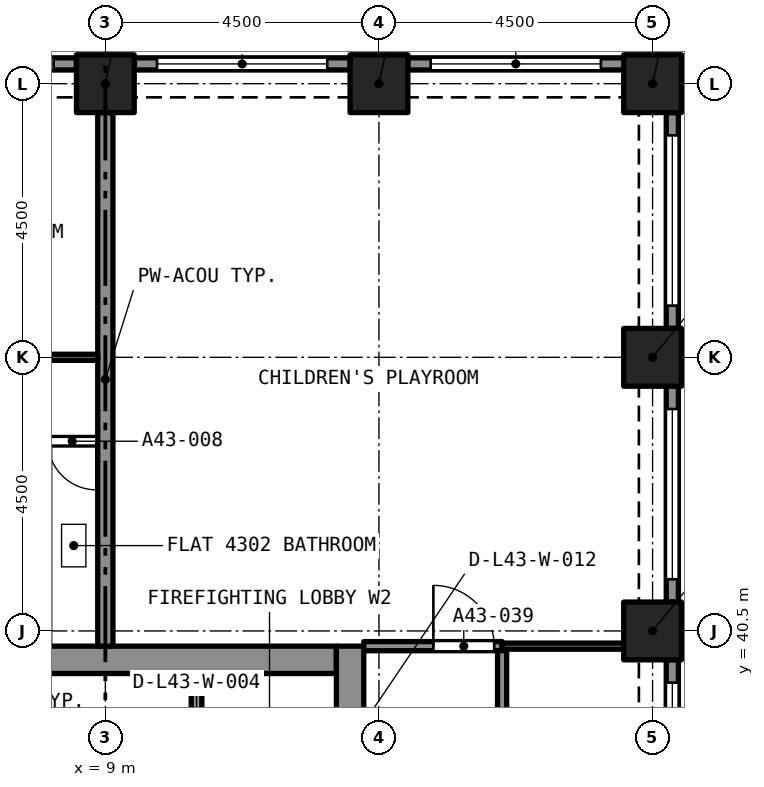
"""IFC4 building model, lengths in metres.
Left out: names, types, materials, properties, quantities, classifications, styles, units other than length and angle.
Written with IfcOpenShell. Run it as: python <this file> out.ifc"""

import sys

from ifc_helpers import new_model, si_unit, direction, frame, frame_2d, origin, origin_2d, place, context, subcontext, project, spatial, rectangle, extrude, element, fill, save


model = new_model("IFC4")
c1 = context("Model", 3, precision=1e-05, world=origin(), true_north=direction((0.0, 1.0)))
c2 = subcontext(c1, "Body", "Model", "MODEL_VIEW")
j1 = project(units=[si_unit("LENGTHUNIT", "METRE"), si_unit("PLANEANGLEUNIT", "RADIAN")], contexts=[c1])
p1 = place(None, origin())
s1 = spatial("IfcSite", under=j1, at=p1, CompositionType="ELEMENT")
p2 = place(p1, origin())
s2 = spatial("IfcBuilding", under=s1, at=p2, CompositionType="ELEMENT")
p3 = place(p2, frame((0.0, 0.0, 155.0)))
s3 = spatial("IfcBuildingStorey", under=s2, at=p3, CompositionType="ELEMENT", Elevation=155.0)
for number, where, z_axis, x_axis in (
    (1, (18.0, 40.5, 0.0), (0.0, 0.0, 1.0), (1.0, 0.0, 0.0)),
    (2, (18.0, 45.0, 0.0), (0.0, 0.0, 1.0), (1.0, 0.0, 0.0)),
    (3, (9.0, 49.5, 0.0), (0.0, 0.0, 1.0), (1.0, 0.0, 0.0)),
    (4, (13.5, 49.5, 0.0), (0.0, 0.0, 1.0), (1.0, 0.0, 0.0)),
    (5, (18.0, 49.5, 0.0), (0.0, 0.0, 1.0), (1.0, 0.0, 0.0)),
):
    element("IfcColumn", number, at=place(p3, frame(where, z_axis=z_axis, x_axis=x_axis)), inside=s3, PredefinedType="COLUMN", context=c2, shape_type="SweptSolid", body=[
        extrude(rectangle(XDim=0.95, YDim=0.95, at=origin_2d()), origin(), (0.0, 0.0, 1.0), 4.4),
    ])
p4 = place(p3, frame((5.2, 40.025, 0.0), z_axis=(0.0, 0.0, 1.0), x_axis=(1.0, 0.0, 0.0)))
e6 = element("IfcWall", 6, at=p4, inside=s3, PredefinedType="SOLIDWALL", context=c2, shape_type="SweptSolid", body=[
    extrude(rectangle(XDim=7.6, YDim=0.45, at=frame_2d((3.8, 0.0))), origin(), (0.0, 0.0, 1.0), 4.4),
])
p5 = place(p3, frame((13.025, 27.25, 0.0), z_axis=(0.0, 0.0, 1.0), x_axis=(0.0, 1.0, 0.0)))
e7 = element("IfcWall", 7, at=p5, inside=s3, PredefinedType="SOLIDWALL", context=c2, shape_type="SweptSolid", body=[
    extrude(rectangle(XDim=13.0, YDim=0.45, at=frame_2d((6.5, 0.0))), origin(), (0.0, 0.0, 1.0), 4.4),
])
p6 = place(p5, frame((10.85, 0.0, 0.0)))
e8 = element("IfcOpeningElement", 8, at=p6, cuts=e7, PredefinedType="OPENING", context=c2, shape_type="SweptSolid", body=[
    extrude(rectangle(XDim=1.1, YDim=2.1, at=frame_2d((0.55, 1.05))), frame((0.0, 0.235, 0.0), z_axis=(0.0, -1.0, 0.0), x_axis=(1.0, 0.0, 0.0)), (0.0, 0.0, 1.0), 0.47),
])
p7 = place(p5, frame((8.7, 0.0, 0.0)))
e9 = element("IfcOpeningElement", 9, at=p7, cuts=e7, PredefinedType="OPENING", context=c2, shape_type="SweptSolid", body=[
    extrude(rectangle(XDim=1.2, YDim=2.1, at=frame_2d((0.6, 1.05))), frame((0.0, 0.235, 0.0), z_axis=(0.0, -1.0, 0.0), x_axis=(1.0, 0.0, 0.0)), (0.0, 0.0, 1.0), 0.47),
])
p8 = place(p3, frame((13.975, 49.825, 0.0), z_axis=(0.0, 0.0, 1.0), x_axis=(1.0, 0.0, 0.0)))
e10 = element("IfcWall", 10, at=p8, inside=s3, PredefinedType="SOLIDWALL", context=c2, shape_type="SweptSolid", body=[
    extrude(rectangle(XDim=3.55, YDim=0.2, at=frame_2d((1.775, 0.0))), origin(), (0.0, 0.0, 1.0), 4.4),
])
p9 = place(p8, frame((0.375, 0.0, 0.45)))
e11 = element("IfcOpeningElement", 11, at=p9, cuts=e10, PredefinedType="OPENING", context=c2, shape_type="SweptSolid", body=[
    extrude(rectangle(XDim=2.8, YDim=2.55, at=frame_2d((1.4, 1.275))), frame((0.0, 0.11, 0.0), z_axis=(0.0, -1.0, 0.0), x_axis=(1.0, 0.0, 0.0)), (0.0, 0.0, 1.0), 0.22),
])
p10 = place(p3, frame((9.475, 49.825, 0.0), z_axis=(0.0, 0.0, 1.0), x_axis=(1.0, 0.0, 0.0)))
e12 = element("IfcWall", 12, at=p10, inside=s3, PredefinedType="SOLIDWALL", context=c2, shape_type="SweptSolid", body=[
    extrude(rectangle(XDim=3.55, YDim=0.2, at=frame_2d((1.775, 0.0))), origin(), (0.0, 0.0, 1.0), 4.4),
])
p11 = place(p10, frame((0.375, 0.0, 0.45)))
e13 = element("IfcOpeningElement", 13, at=p11, cuts=e12, PredefinedType="OPENING", context=c2, shape_type="SweptSolid", body=[
    extrude(rectangle(XDim=2.8, YDim=2.55, at=frame_2d((1.4, 1.275))), frame((0.0, 0.11, 0.0), z_axis=(0.0, -1.0, 0.0), x_axis=(1.0, 0.0, 0.0)), (0.0, 0.0, 1.0), 0.22),
])
p12 = place(p3, frame((4.975, 49.825, 0.0), z_axis=(0.0, 0.0, 1.0), x_axis=(1.0, 0.0, 0.0)))
e14 = element("IfcWall", 14, at=p12, inside=s3, PredefinedType="SOLIDWALL", context=c2, shape_type="SweptSolid", body=[
    extrude(rectangle(XDim=3.55, YDim=0.2, at=frame_2d((1.775, 0.0))), origin(), (0.0, 0.0, 1.0), 4.4),
])
p13 = place(p12, frame((0.375, 0.0, 0.45)))
e15 = element("IfcOpeningElement", 15, at=p13, cuts=e14, PredefinedType="OPENING", context=c2, shape_type="SweptSolid", body=[
    extrude(rectangle(XDim=2.8, YDim=2.55, at=frame_2d((1.4, 1.275))), frame((0.0, 0.11, 0.0), z_axis=(0.0, -1.0, 0.0), x_axis=(1.0, 0.0, 0.0)), (0.0, 0.0, 1.0), 0.22),
])
p14 = place(p3, frame((18.325, 40.025, 0.0), z_axis=(0.0, 0.0, 1.0), x_axis=(0.0, -1.0, 0.0)))
e16 = element("IfcWall", 16, at=p14, inside=s3, PredefinedType="SOLIDWALL", context=c2, shape_type="SweptSolid", body=[
    extrude(rectangle(XDim=3.55, YDim=0.2, at=frame_2d((1.775, 0.0))), origin(), (0.0, 0.0, 1.0), 4.4),
])
p15 = place(p14, frame((0.375, 0.0, 0.45)))
e17 = element("IfcOpeningElement", 17, at=p15, cuts=e16, PredefinedType="OPENING", context=c2, shape_type="SweptSolid", body=[
    extrude(rectangle(XDim=2.8, YDim=2.55, at=frame_2d((1.4, 1.275))), frame((0.0, 0.11, 0.0), z_axis=(0.0, -1.0, 0.0), x_axis=(1.0, 0.0, 0.0)), (0.0, 0.0, 1.0), 0.22),
])
p16 = place(p3, frame((18.325, 44.525, 0.0), z_axis=(0.0, 0.0, 1.0), x_axis=(0.0, -1.0, 0.0)))
e18 = element("IfcWall", 18, at=p16, inside=s3, PredefinedType="SOLIDWALL", context=c2, shape_type="SweptSolid", body=[
    extrude(rectangle(XDim=3.55, YDim=0.2, at=frame_2d((1.775, 0.0))), origin(), (0.0, 0.0, 1.0), 4.4),
])
p17 = place(p16, frame((0.375, 0.0, 0.45)))
e19 = element("IfcOpeningElement", 19, at=p17, cuts=e18, PredefinedType="OPENING", context=c2, shape_type="SweptSolid", body=[
    extrude(rectangle(XDim=2.8, YDim=2.55, at=frame_2d((1.4, 1.275))), frame((0.0, 0.11, 0.0), z_axis=(0.0, -1.0, 0.0), x_axis=(1.0, 0.0, 0.0)), (0.0, 0.0, 1.0), 0.22),
])
p18 = place(p3, frame((18.325, 49.025, 0.0), z_axis=(0.0, 0.0, 1.0), x_axis=(0.0, -1.0, 0.0)))
e20 = element("IfcWall", 20, at=p18, inside=s3, PredefinedType="SOLIDWALL", context=c2, shape_type="SweptSolid", body=[
    extrude(rectangle(XDim=3.55, YDim=0.2, at=frame_2d((1.775, 0.0))), origin(), (0.0, 0.0, 1.0), 4.4),
])
p19 = place(p18, frame((0.375, 0.0, 0.45)))
e21 = element("IfcOpeningElement", 21, at=p19, cuts=e20, PredefinedType="OPENING", context=c2, shape_type="SweptSolid", body=[
    extrude(rectangle(XDim=2.8, YDim=2.55, at=frame_2d((1.4, 1.275))), frame((0.0, 0.11, 0.0), z_axis=(0.0, -1.0, 0.0), x_axis=(1.0, 0.0, 0.0)), (0.0, 0.0, 1.0), 0.22),
])
p20 = place(p3, frame((8.875, 43.62, 0.0), z_axis=(0.0, 0.0, 1.0), x_axis=(-1.0, 0.0, 0.0)))
e22 = element("IfcWall", 22, at=p20, inside=s3, PredefinedType="PARTITIONING", context=c2, shape_type="SweptSolid", body=[
    extrude(rectangle(XDim=0.852, YDim=0.125, at=frame_2d((0.426, 0.0))), origin(), (0.0, 0.0, 1.0), 4.1),
])
p21 = place(p20, frame((0.02, 0.0, 0.0)))
e23 = element("IfcOpeningElement", 23, at=p21, cuts=e22, PredefinedType="OPENING", context=c2, shape_type="SweptSolid", body=[
    extrude(rectangle(XDim=0.8, YDim=2.1, at=frame_2d((0.4, 1.05))), frame((0.0, 0.073, 0.0), z_axis=(0.0, -1.0, 0.0), x_axis=(1.0, 0.0, 0.0)), (0.0, 0.0, 1.0), 0.145),
])
p22 = place(p3, frame((9.0, 40.25, 0.0), z_axis=(0.0, 0.0, 1.0), x_axis=(0.0, 1.0, 0.0)))
e24 = element("IfcWall", 24, at=p22, inside=s3, PredefinedType="PARTITIONING", context=c2, shape_type="SweptSolid", body=[
    extrude(rectangle(XDim=8.775, YDim=0.25, at=frame_2d((4.387, 0.0))), origin(), (0.0, 0.0, 1.0), 4.1),
])
p23 = place(p3, frame((4.5, 45.0, 0.0), z_axis=(0.0, 0.0, 1.0), x_axis=(1.0, 0.0, 0.0)))
e25 = element("IfcWall", 25, at=p23, inside=s3, PredefinedType="PARTITIONING", context=c2, shape_type="SweptSolid", body=[
    extrude(rectangle(XDim=4.375, YDim=0.1, at=frame_2d((2.188, 0.0))), origin(), (0.0, 0.0, 1.0), 4.1),
])
p24 = place(p23, frame((1.8, 0.0, 0.0)))
e26 = element("IfcOpeningElement", 26, at=p24, cuts=e25, PredefinedType="OPENING", context=c2, shape_type="SweptSolid", body=[
    extrude(rectangle(XDim=0.9, YDim=2.1, at=frame_2d((0.45, 1.05))), frame((0.0, 0.06, 0.0), z_axis=(0.0, -1.0, 0.0), x_axis=(1.0, 0.0, 0.0)), (0.0, 0.0, 1.0), 0.12),
])
p25 = place(p3, frame((13.25, 40.25, 0.0), z_axis=(0.0, 0.0, 1.0), x_axis=(1.0, 0.0, 0.0)))
e27 = element("IfcWall", 27, at=p25, inside=s3, PredefinedType="PARTITIONING", context=c2, shape_type="SweptSolid", body=[
    extrude(rectangle(XDim=2.275, YDim=0.15, at=frame_2d((1.137, 0.0))), origin(), (0.0, 0.0, 1.0), 4.1),
])
p26 = place(p25, frame((1.145, 0.0, 0.0)))
e28 = element("IfcOpeningElement", 28, at=p26, cuts=e27, PredefinedType="OPENING", context=c2, shape_type="SweptSolid", body=[
    extrude(rectangle(XDim=1.0, YDim=2.1, at=frame_2d((0.5, 1.05))), frame((0.0, 0.085, 0.0), z_axis=(0.0, -1.0, 0.0), x_axis=(1.0, 0.0, 0.0)), (0.0, 0.0, 1.0), 0.17),
])
p27 = place(p3, frame((15.525, 40.25, 0.0), z_axis=(0.0, 0.0, 1.0), x_axis=(1.0, 0.0, 0.0)))
e29 = element("IfcWall", 29, at=p27, inside=s3, PredefinedType="PARTITIONING", context=c2, shape_type="SweptSolid", body=[
    extrude(rectangle(XDim=2.0, YDim=0.1, at=frame_2d((1.0, 0.0))), origin(), (0.0, 0.0, 1.0), 4.1),
])
p28 = place(p3, frame((15.525, 40.175, 0.0), z_axis=(0.0, 0.0, 1.0), x_axis=(0.0, -1.0, 0.0)))
e30 = element("IfcWall", 30, at=p28, inside=s3, PredefinedType="PARTITIONING", context=c2, shape_type="SweptSolid", body=[
    extrude(rectangle(XDim=13.0, YDim=0.15, at=frame_2d((6.5, 0.0))), origin(), (0.0, 0.0, 1.0), 4.1),
])
p29 = place(p28, frame((5.925, 0.0, 0.0)))
e31 = element("IfcOpeningElement", 31, at=p29, cuts=e30, PredefinedType="OPENING", context=c2, shape_type="SweptSolid", body=[
    extrude(rectangle(XDim=1.0, YDim=2.1, at=frame_2d((0.5, 1.05))), frame((0.0, 0.085, 0.0), z_axis=(0.0, -1.0, 0.0), x_axis=(1.0, 0.0, 0.0)), (0.0, 0.0, 1.0), 0.17),
])
p30 = place(p3, frame((10.5, 37.5, 0.0), z_axis=(0.0, 0.0, 1.0), x_axis=(0.0, 1.0, 0.0)))
e32 = element("IfcWall", 32, at=p30, inside=s3, PredefinedType="SOLIDWALL", context=c2, shape_type="SweptSolid", body=[
    extrude(rectangle(XDim=2.3, YDim=0.175, at=frame_2d((1.15, 0.0))), origin(), (0.0, 0.0, 1.0), 4.1),
])
p31 = place(p30, frame((0.65, 0.0, 0.0)))
e33 = element("IfcOpeningElement", 33, at=p31, cuts=e32, PredefinedType="OPENING", context=c2, shape_type="SweptSolid", body=[
    extrude(rectangle(XDim=1.0, YDim=2.1, at=frame_2d((0.5, 1.05))), frame((0.0, 0.097, 0.0), z_axis=(0.0, -1.0, 0.0), x_axis=(1.0, 0.0, 0.0)), (0.0, 0.0, 1.0), 0.195),
])
p32 = place(p9, origin())
e34 = element("IfcWindow", 34, at=p32, inside=s3, PartitioningType="SINGLE_PANEL", PredefinedType="WINDOW", context=c2, shape_type="SweptSolid", body=[
    extrude(rectangle(XDim=2.8, YDim=2.55, at=frame_2d((1.4, 1.275))), frame((0.0, 0.03, 0.0), z_axis=(0.0, -1.0, 0.0), x_axis=(1.0, 0.0, 0.0)), (0.0, 0.0, 1.0), 0.06),
])
fill(e11, e34)
p33 = place(p11, origin())
e35 = element("IfcWindow", 35, at=p33, inside=s3, PartitioningType="SINGLE_PANEL", PredefinedType="WINDOW", context=c2, shape_type="SweptSolid", body=[
    extrude(rectangle(XDim=2.8, YDim=2.55, at=frame_2d((1.4, 1.275))), frame((0.0, 0.03, 0.0), z_axis=(0.0, -1.0, 0.0), x_axis=(1.0, 0.0, 0.0)), (0.0, 0.0, 1.0), 0.06),
])
fill(e13, e35)
p34 = place(p13, origin())
e36 = element("IfcWindow", 36, at=p34, inside=s3, PartitioningType="SINGLE_PANEL", PredefinedType="WINDOW", context=c2, shape_type="SweptSolid", body=[
    extrude(rectangle(XDim=2.8, YDim=2.55, at=frame_2d((1.4, 1.275))), frame((0.0, 0.03, 0.0), z_axis=(0.0, -1.0, 0.0), x_axis=(1.0, 0.0, 0.0)), (0.0, 0.0, 1.0), 0.06),
])
fill(e15, e36)
p35 = place(p15, origin())
e37 = element("IfcWindow", 37, at=p35, inside=s3, PartitioningType="SINGLE_PANEL", PredefinedType="WINDOW", context=c2, shape_type="SweptSolid", body=[
    extrude(rectangle(XDim=2.8, YDim=2.55, at=frame_2d((1.4, 1.275))), frame((0.0, 0.03, 0.0), z_axis=(0.0, -1.0, 0.0), x_axis=(1.0, 0.0, 0.0)), (0.0, 0.0, 1.0), 0.06),
])
fill(e17, e37)
p36 = place(p17, origin())
e38 = element("IfcWindow", 38, at=p36, inside=s3, PartitioningType="SINGLE_PANEL", PredefinedType="WINDOW", context=c2, shape_type="SweptSolid", body=[
    extrude(rectangle(XDim=2.8, YDim=2.55, at=frame_2d((1.4, 1.275))), frame((0.0, 0.03, 0.0), z_axis=(0.0, -1.0, 0.0), x_axis=(1.0, 0.0, 0.0)), (0.0, 0.0, 1.0), 0.06),
])
fill(e19, e38)
p37 = place(p19, origin())
e39 = element("IfcWindow", 39, at=p37, inside=s3, PartitioningType="SINGLE_PANEL", PredefinedType="WINDOW", context=c2, shape_type="SweptSolid", body=[
    extrude(rectangle(XDim=2.8, YDim=2.55, at=frame_2d((1.4, 1.275))), frame((0.0, 0.03, 0.0), z_axis=(0.0, -1.0, 0.0), x_axis=(1.0, 0.0, 0.0)), (0.0, 0.0, 1.0), 0.06),
])
fill(e21, e39)
p38 = place(p21, origin())
e40 = element("IfcDoor", 40, at=p38, inside=s3, OperationType="SINGLE_SWING_LEFT", PredefinedType="DOOR", context=c2, shape_type="SweptSolid", body=[
    extrude(rectangle(XDim=0.8, YDim=2.1, at=frame_2d((0.4, 1.05))), frame((0.0, 0.025, 0.0), z_axis=(0.0, -1.0, 0.0), x_axis=(1.0, 0.0, 0.0)), (0.0, 0.0, 1.0), 0.05),
])
fill(e23, e40)
p39 = place(p26, origin())
e41 = element("IfcDoor", 41, at=p39, inside=s3, OperationType="SINGLE_SWING_RIGHT", PredefinedType="DOOR", context=c2, shape_type="SweptSolid", body=[
    extrude(rectangle(XDim=1.0, YDim=2.1, at=frame_2d((0.5, 1.05))), frame((0.0, 0.025, 0.0), z_axis=(0.0, -1.0, 0.0), x_axis=(1.0, 0.0, 0.0)), (0.0, 0.0, 1.0), 0.05),
])
fill(e28, e41)
save(model, sys.argv[1])
